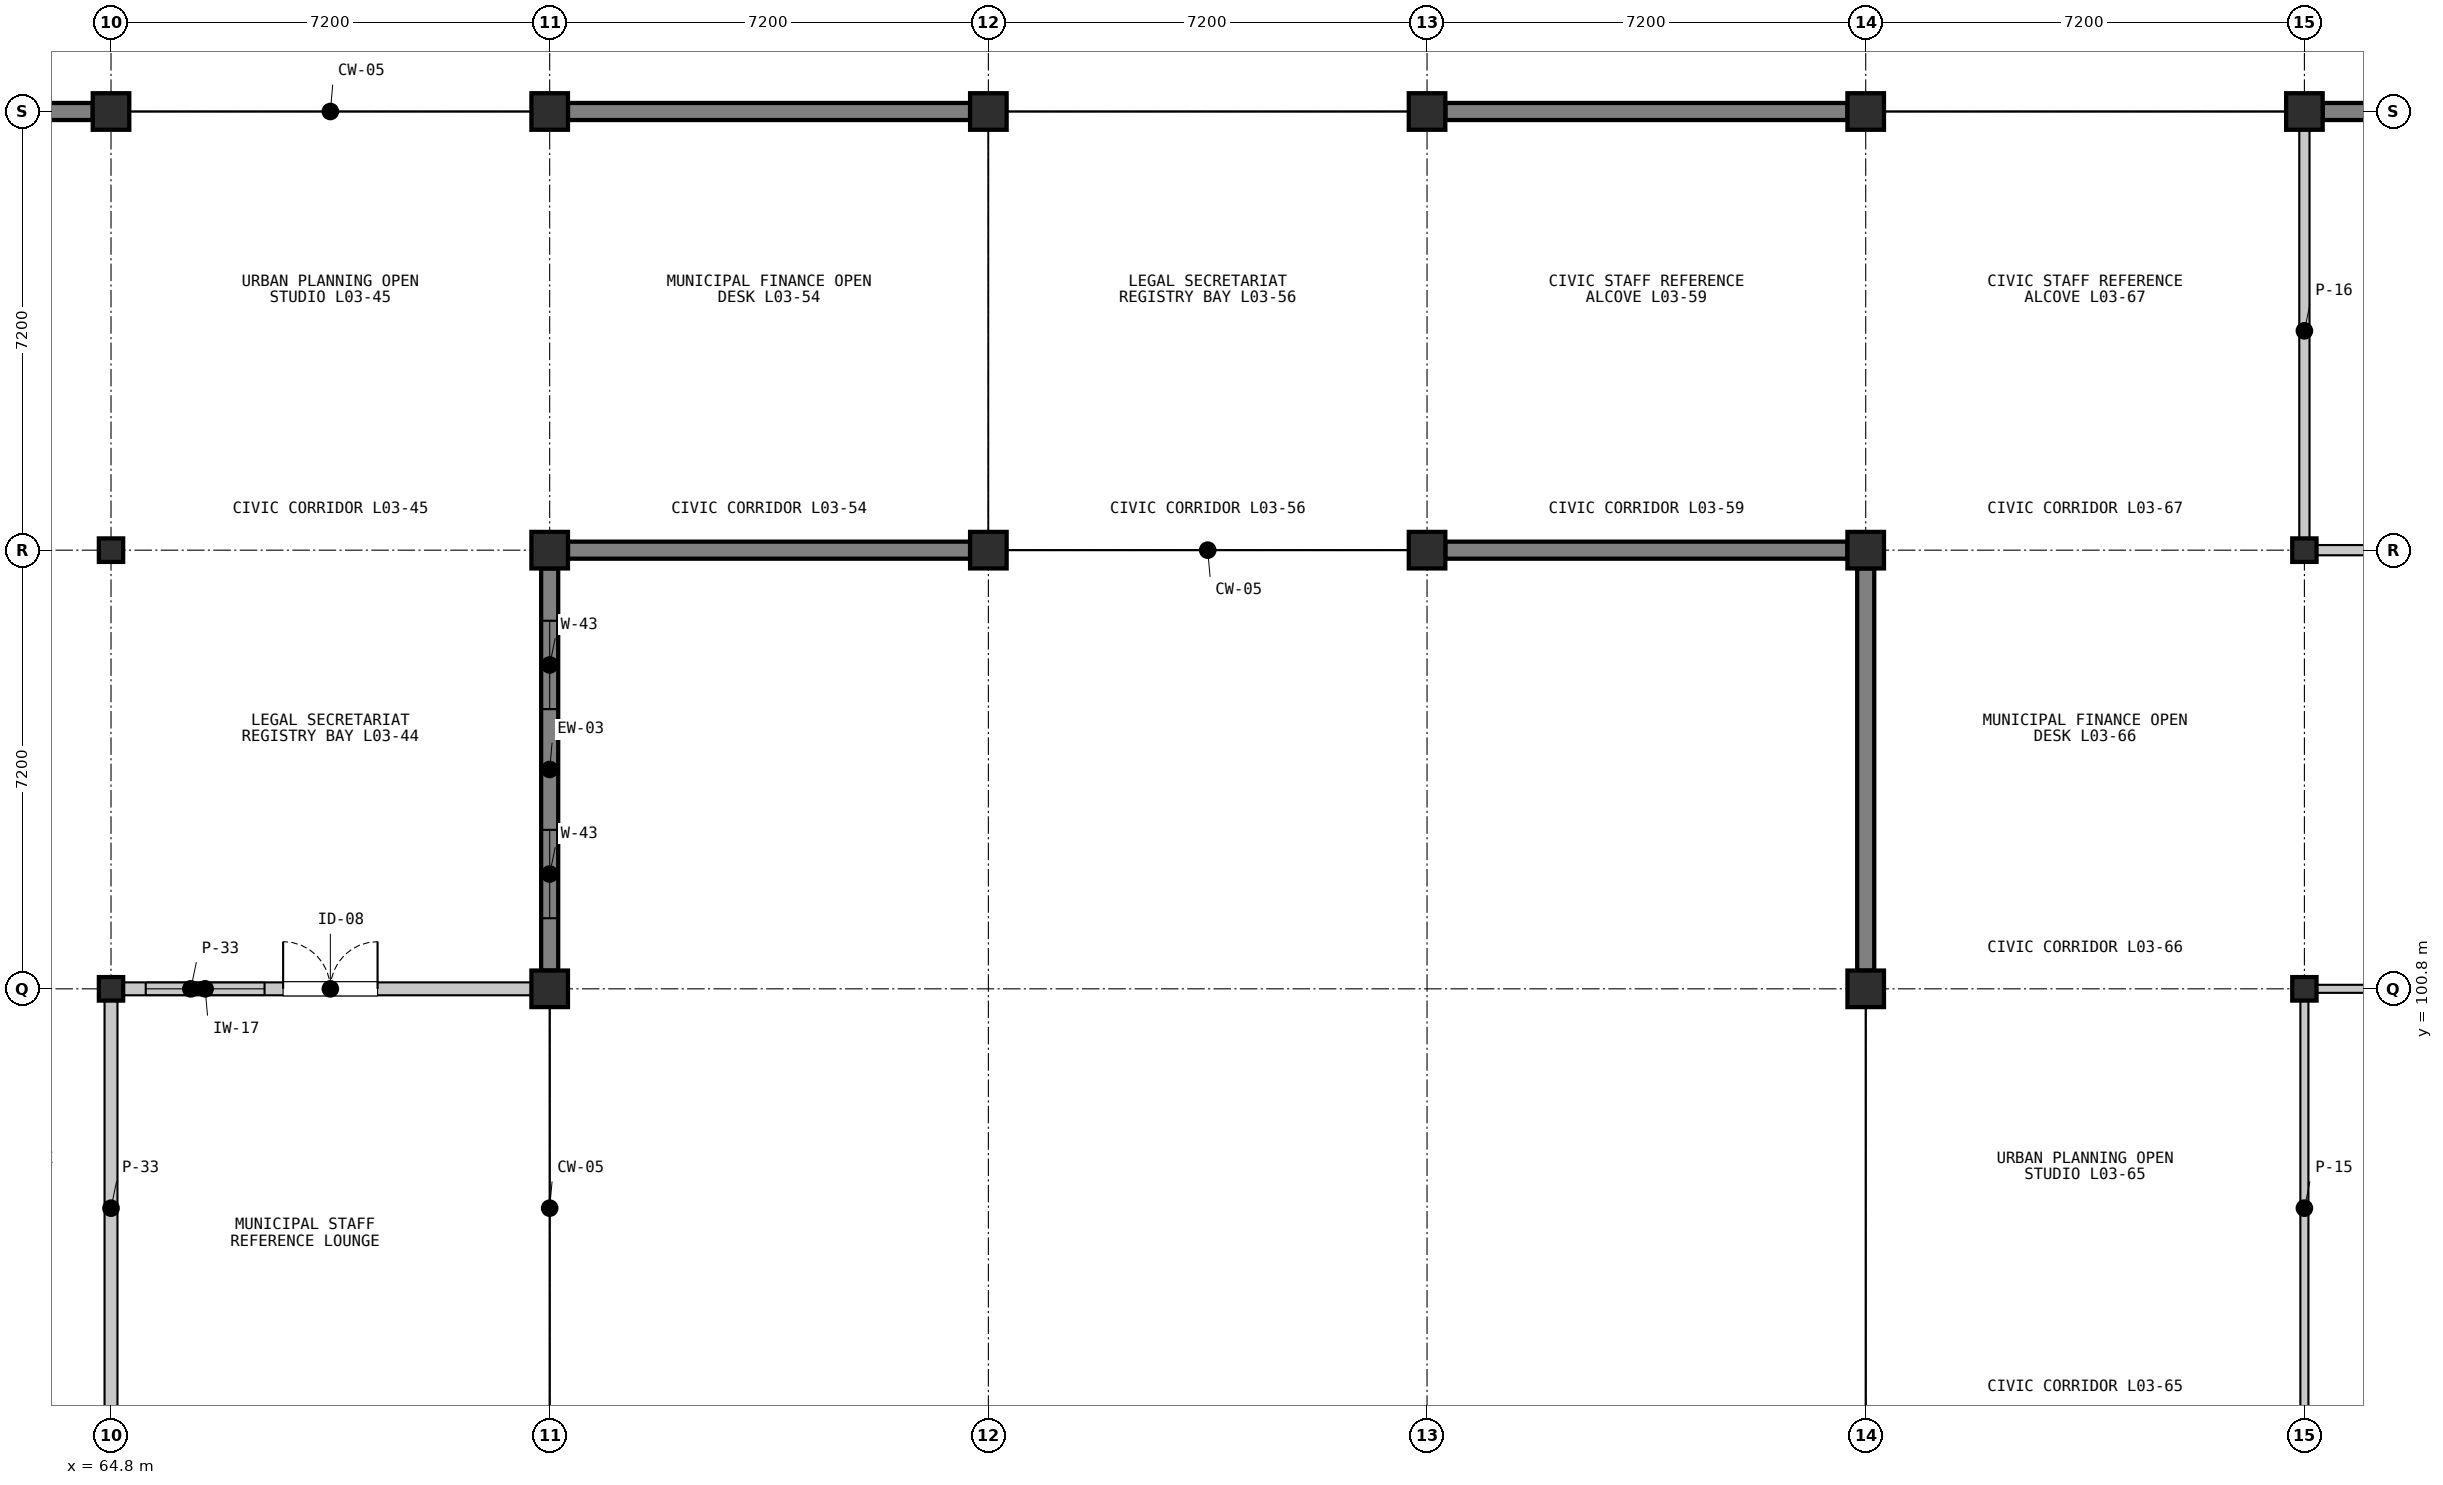
"""IFC4 building model, lengths in metres.
Left out: names, types, materials, properties, quantities, classifications, styles, units other than length and angle.
Written with IfcOpenShell. Run it as: python <this file> out.ifc"""

import sys

from ifc_helpers import new_model, si_unit, direction, frame, frame_2d, origin, origin_2d, place, context, subcontext, project, spatial, rectangle, i_section, extrude, element, fill, save


model = new_model("IFC4")
c1 = context("Model", 3, precision=1e-05, world=origin(), true_north=direction((0.0, 1.0)))
c2 = subcontext(c1, "Body", "Model", "MODEL_VIEW")
j1 = project(units=[si_unit("LENGTHUNIT", "METRE"), si_unit("PLANEANGLEUNIT", "RADIAN")], contexts=[c1])
p1 = place(None, origin())
s1 = spatial("IfcSite", under=j1, at=p1, CompositionType="ELEMENT")
p2 = place(p1, origin())
s2 = spatial("IfcBuilding", under=s1, at=p2, CompositionType="ELEMENT")
p3 = place(p2, frame((0.0, 0.0, 9.9)))
s3 = spatial("IfcBuildingStorey", under=s2, at=p3, CompositionType="ELEMENT", Elevation=9.9)
for number, where, z_axis, x_axis in (
    (1, (64.8, 100.8, 0.0), (0.0, 0.0, 1.0), (1.0, 0.0, 0.0)),
    (2, (64.8, 108.0, 0.0), (0.0, 0.0, 1.0), (1.0, 0.0, 0.0)),
):
    element("IfcColumn", number, at=place(p3, frame(where, z_axis=z_axis, x_axis=x_axis)), inside=s3, PredefinedType="COLUMN", context=c2, shape_type="SweptSolid", body=[
        extrude(i_section(OverallWidth=0.399, OverallDepth=0.386, WebThickness=0.021, FlangeThickness=0.033, FilletRadius=0.015, at=origin_2d()), origin(), (0.0, 0.0, 1.0), 4.2),
    ])
for number, where, z_axis, x_axis in (
    (3, (64.8, 115.2, 0.0), (0.0, 0.0, 1.0), (1.0, 0.0, 0.0)),
    (4, (72.0, 100.8, 0.0), (0.0, 0.0, 1.0), (1.0, 0.0, 0.0)),
    (5, (72.0, 108.0, 0.0), (0.0, 0.0, 1.0), (1.0, 0.0, 0.0)),
    (6, (72.0, 115.2, 0.0), (0.0, 0.0, 1.0), (1.0, 0.0, 0.0)),
    (7, (79.2, 108.0, 0.0), (0.0, 0.0, 1.0), (1.0, 0.0, 0.0)),
    (8, (79.2, 115.2, 0.0), (0.0, 0.0, 1.0), (1.0, 0.0, 0.0)),
    (9, (86.4, 108.0, 0.0), (0.0, 0.0, 1.0), (1.0, 0.0, 0.0)),
    (10, (86.4, 115.2, 0.0), (0.0, 0.0, 1.0), (1.0, 0.0, 0.0)),
    (11, (93.6, 100.8, 0.0), (0.0, 0.0, 1.0), (1.0, 0.0, 0.0)),
    (12, (93.6, 108.0, 0.0), (0.0, 0.0, 1.0), (1.0, 0.0, 0.0)),
    (13, (93.6, 115.2, 0.0), (0.0, 0.0, 1.0), (1.0, 0.0, 0.0)),
):
    element("IfcColumn", number, at=place(p3, frame(where, z_axis=z_axis, x_axis=x_axis)), inside=s3, PredefinedType="COLUMN", context=c2, shape_type="SweptSolid", body=[
        extrude(rectangle(XDim=0.6, YDim=0.6, at=origin_2d()), origin(), (0.0, 0.0, 1.0), 4.2),
    ])
for number, where, z_axis, x_axis in (
    (14, (100.8, 100.8, 0.0), (0.0, 0.0, 1.0), (1.0, 0.0, 0.0)),
    (15, (100.8, 108.0, 0.0), (0.0, 0.0, 1.0), (1.0, 0.0, 0.0)),
):
    element("IfcColumn", number, at=place(p3, frame(where, z_axis=z_axis, x_axis=x_axis)), inside=s3, PredefinedType="COLUMN", context=c2, shape_type="SweptSolid", body=[
        extrude(i_section(OverallWidth=0.399, OverallDepth=0.386, WebThickness=0.021, FlangeThickness=0.033, FilletRadius=0.015, at=origin_2d()), origin(), (0.0, 0.0, 1.0), 4.2),
    ])
p4 = place(p3, frame((100.8, 115.2, 0.0), z_axis=(0.0, 0.0, 1.0), x_axis=(1.0, 0.0, 0.0)))
e16 = element("IfcColumn", 16, at=p4, inside=s3, PredefinedType="COLUMN", context=c2, shape_type="SweptSolid", body=[
    extrude(rectangle(XDim=0.6, YDim=0.6, at=origin_2d()), origin(), (0.0, 0.0, 1.0), 4.2),
])
p5 = place(p3, frame((57.9, 115.2, 0.0), z_axis=(0.0, 0.0, 1.0), x_axis=(1.0, 0.0, 0.0)))
e17 = element("IfcWall", 17, at=p5, inside=s3, PredefinedType="SOLIDWALL", context=c2, shape_type="SweptSolid", body=[
    extrude(rectangle(XDim=6.6, YDim=0.28, at=frame_2d((3.3, 0.0))), origin(), (0.0, 0.0, 1.0), 3.418),
])
p6 = place(p3, frame((72.0, 107.7, 0.0), z_axis=(0.0, 0.0, 1.0), x_axis=(0.0, -1.0, 0.0)))
e18 = element("IfcWall", 18, at=p6, inside=s3, PredefinedType="SOLIDWALL", context=c2, shape_type="SweptSolid", body=[
    extrude(rectangle(XDim=6.6, YDim=0.28, at=frame_2d((3.3, 0.0))), origin(), (0.0, 0.0, 1.0), 3.487),
])
p7 = place(p6, frame((0.859, 0.0, 0.95)))
e19 = element("IfcOpeningElement", 19, at=p7, cuts=e18, PredefinedType="OPENING", context=c2, shape_type="SweptSolid", body=[
    extrude(rectangle(XDim=1.45, YDim=1.85, at=frame_2d((0.725, 0.925))), frame((0.0, 0.15, 0.0), z_axis=(0.0, -1.0, 0.0), x_axis=(1.0, 0.0, 0.0)), (0.0, 0.0, 1.0), 0.3),
])
p8 = place(p6, frame((4.291, 0.0, 0.95)))
e20 = element("IfcOpeningElement", 20, at=p8, cuts=e18, PredefinedType="OPENING", context=c2, shape_type="SweptSolid", body=[
    extrude(rectangle(XDim=1.45, YDim=1.85, at=frame_2d((0.725, 0.925))), frame((0.0, 0.15, 0.0), z_axis=(0.0, -1.0, 0.0), x_axis=(1.0, 0.0, 0.0)), (0.0, 0.0, 1.0), 0.3),
])
for number, where, z_axis, x_axis in (
    (21, (78.9, 108.0, 0.0), (0.0, 0.0, 1.0), (-1.0, 0.0, 0.0)),
    (22, (72.3, 115.2, 0.0), (0.0, 0.0, 1.0), (1.0, 0.0, 0.0)),
):
    element("IfcWall", number, at=place(p3, frame(where, z_axis=z_axis, x_axis=x_axis)), inside=s3, PredefinedType="SOLIDWALL", context=c2, shape_type="SweptSolid", body=[
        extrude(rectangle(XDim=6.6, YDim=0.28, at=frame_2d((3.3, 0.0))), origin(), (0.0, 0.0, 1.0), 3.418),
    ])
for number, where, z_axis, x_axis in (
    (23, (93.3, 108.0, 0.0), (0.0, 0.0, 1.0), (-1.0, 0.0, 0.0)),
    (24, (86.7, 115.2, 0.0), (0.0, 0.0, 1.0), (1.0, 0.0, 0.0)),
):
    element("IfcWall", number, at=place(p3, frame(where, z_axis=z_axis, x_axis=x_axis)), inside=s3, PredefinedType="SOLIDWALL", context=c2, shape_type="SweptSolid", body=[
        extrude(rectangle(XDim=6.6, YDim=0.28, at=frame_2d((3.3, 0.0))), origin(), (0.0, 0.0, 1.0), 3.418),
    ])
p9 = place(p3, frame((93.6, 101.1, 0.0), z_axis=(0.0, 0.0, 1.0), x_axis=(0.0, 1.0, 0.0)))
e25 = element("IfcWall", 25, at=p9, inside=s3, PredefinedType="SOLIDWALL", context=c2, shape_type="SweptSolid", body=[
    extrude(rectangle(XDim=6.6, YDim=0.28, at=frame_2d((3.3, 0.0))), origin(), (0.0, 0.0, 1.0), 3.487),
])
p10 = place(p3, frame((101.1, 115.2, 0.0), z_axis=(0.0, 0.0, 1.0), x_axis=(1.0, 0.0, 0.0)))
e26 = element("IfcWall", 26, at=p10, inside=s3, PredefinedType="SOLIDWALL", context=c2, shape_type="SweptSolid", body=[
    extrude(rectangle(XDim=6.65, YDim=0.28, at=frame_2d((3.325, 0.0))), origin(), (0.0, 0.0, 1.0), 3.418),
])
p11 = place(p10, frame((0.921, 0.0, 0.95)))
e27 = element("IfcOpeningElement", 27, at=p11, cuts=e26, PredefinedType="OPENING", context=c2, shape_type="SweptSolid", body=[
    extrude(rectangle(XDim=1.35, YDim=1.85, at=frame_2d((0.675, 0.925))), frame((0.0, 0.15, 0.0), z_axis=(0.0, -1.0, 0.0), x_axis=(1.0, 0.0, 0.0)), (0.0, 0.0, 1.0), 0.3),
])
p12 = place(p10, frame((4.379, 0.0, 0.95)))
e28 = element("IfcOpeningElement", 28, at=p12, cuts=e26, PredefinedType="OPENING", context=c2, shape_type="SweptSolid", body=[
    extrude(rectangle(XDim=1.35, YDim=1.85, at=frame_2d((0.675, 0.925))), frame((0.0, 0.15, 0.0), z_axis=(0.0, -1.0, 0.0), x_axis=(1.0, 0.0, 0.0)), (0.0, 0.0, 1.0), 0.3),
])
p13 = place(p3, frame((64.92, 100.8, 0.0), z_axis=(0.0, 0.0, 1.0), x_axis=(1.0, 0.0, 0.0)))
e29 = element("IfcWall", 29, at=p13, inside=s3, PredefinedType="PARTITIONING", context=c2, shape_type="SweptSolid", body=[
    extrude(rectangle(XDim=6.96, YDim=0.212, at=frame_2d((3.48, 0.0))), origin(), (0.0, 0.0, 1.0), 3.408),
])
p14 = place(p13, frame((2.705, 0.0, 0.0)))
e30 = element("IfcOpeningElement", 30, at=p14, cuts=e29, PredefinedType="OPENING", context=c2, shape_type="SweptSolid", body=[
    extrude(rectangle(XDim=1.55, YDim=2.3, at=frame_2d((0.775, 1.15))), frame((0.0, 0.116, 0.0), z_axis=(0.0, -1.0, 0.0), x_axis=(1.0, 0.0, 0.0)), (0.0, 0.0, 1.0), 0.232),
])
p15 = place(p13, frame((0.45, 0.0, 1.05)))
e31 = element("IfcOpeningElement", 31, at=p15, cuts=e29, PredefinedType="OPENING", context=c2, shape_type="SweptSolid", body=[
    extrude(rectangle(XDim=1.95, YDim=1.22, at=frame_2d((0.975, 0.61))), frame((0.0, 0.116, 0.0), z_axis=(0.0, -1.0, 0.0), x_axis=(1.0, 0.0, 0.0)), (0.0, 0.0, 1.0), 0.232),
])
p16 = place(p3, frame((64.8, 93.72, 0.0), z_axis=(0.0, 0.0, 1.0), x_axis=(0.0, 1.0, 0.0)))
e32 = element("IfcWall", 32, at=p16, inside=s3, PredefinedType="PARTITIONING", context=c2, shape_type="SweptSolid", body=[
    extrude(rectangle(XDim=6.96, YDim=0.212, at=frame_2d((3.48, 0.0))), origin(), (0.0, 0.0, 1.0), 3.408),
])
for number, where, z_axis, x_axis in (
    (33, (100.92, 100.8, 0.0), (0.0, 0.0, 1.0), (1.0, 0.0, 0.0)),
    (34, (100.8, 93.72, 0.0), (0.0, 0.0, 1.0), (0.0, 1.0, 0.0)),
):
    element("IfcWall", number, at=place(p3, frame(where, z_axis=z_axis, x_axis=x_axis)), inside=s3, PredefinedType="PARTITIONING", context=c2, shape_type="SweptSolid", body=[
        extrude(rectangle(XDim=6.96, YDim=0.132, at=frame_2d((3.48, 0.0))), origin(), (0.0, 0.0, 1.0), 3.408),
    ])
p17 = place(p3, frame((107.88, 108.0, 0.0), z_axis=(0.0, 0.0, 1.0), x_axis=(-1.0, 0.0, 0.0)))
e35 = element("IfcWall", 35, at=p17, inside=s3, PredefinedType="PARTITIONING", context=c2, shape_type="SweptSolid", body=[
    extrude(rectangle(XDim=6.96, YDim=0.168, at=frame_2d((3.48, 0.0))), origin(), (0.0, 0.0, 1.0), 3.408),
])
p18 = place(p17, frame((2.705, 0.0, 0.0)))
e36 = element("IfcOpeningElement", 36, at=p18, cuts=e35, PredefinedType="OPENING", context=c2, shape_type="SweptSolid", body=[
    extrude(rectangle(XDim=1.55, YDim=2.3, at=frame_2d((0.775, 1.15))), frame((0.0, 0.094, 0.0), z_axis=(0.0, -1.0, 0.0), x_axis=(1.0, 0.0, 0.0)), (0.0, 0.0, 1.0), 0.188),
])
p19 = place(p17, frame((0.45, 0.0, 1.05)))
e37 = element("IfcOpeningElement", 37, at=p19, cuts=e35, PredefinedType="OPENING", context=c2, shape_type="SweptSolid", body=[
    extrude(rectangle(XDim=1.82, YDim=1.02, at=frame_2d((0.91, 0.51))), frame((0.0, 0.094, 0.0), z_axis=(0.0, -1.0, 0.0), x_axis=(1.0, 0.0, 0.0)), (0.0, 0.0, 1.0), 0.188),
])
p20 = place(p3, frame((100.8, 108.12, 0.0), z_axis=(0.0, 0.0, 1.0), x_axis=(0.0, 1.0, 0.0)))
e38 = element("IfcWall", 38, at=p20, inside=s3, PredefinedType="PARTITIONING", context=c2, shape_type="SweptSolid", body=[
    extrude(rectangle(XDim=6.96, YDim=0.168, at=frame_2d((3.48, 0.0))), origin(), (0.0, 0.0, 1.0), 3.408),
])
p21 = place(p7, origin())
e39 = element("IfcWindow", 39, at=p21, inside=s3, PartitioningType="SINGLE_PANEL", PredefinedType="WINDOW", context=c2, shape_type="SweptSolid", body=[
    extrude(rectangle(XDim=1.45, YDim=1.85, at=frame_2d((0.725, 0.925))), frame((0.0, 0.03, 0.0), z_axis=(0.0, -1.0, 0.0), x_axis=(1.0, 0.0, 0.0)), (0.0, 0.0, 1.0), 0.06),
])
fill(e19, e39)
p22 = place(p8, origin())
e40 = element("IfcWindow", 40, at=p22, inside=s3, PartitioningType="SINGLE_PANEL", PredefinedType="WINDOW", context=c2, shape_type="SweptSolid", body=[
    extrude(rectangle(XDim=1.45, YDim=1.85, at=frame_2d((0.725, 0.925))), frame((0.0, 0.03, 0.0), z_axis=(0.0, -1.0, 0.0), x_axis=(1.0, 0.0, 0.0)), (0.0, 0.0, 1.0), 0.06),
])
fill(e20, e40)
p23 = place(p14, origin())
e41 = element("IfcDoor", 41, at=p23, inside=s3, OperationType="DOUBLE_DOOR_SINGLE_SWING", PredefinedType="DOOR", context=c2, shape_type="SweptSolid", body=[
    extrude(rectangle(XDim=1.55, YDim=2.3, at=frame_2d((0.775, 1.15))), frame((0.0, 0.025, 0.0), z_axis=(0.0, -1.0, 0.0), x_axis=(1.0, 0.0, 0.0)), (0.0, 0.0, 1.0), 0.05),
])
fill(e30, e41)
p24 = place(p15, origin())
e42 = element("IfcWindow", 42, at=p24, inside=s3, PartitioningType="SINGLE_PANEL", PredefinedType="WINDOW", context=c2, shape_type="SweptSolid", body=[
    extrude(rectangle(XDim=1.95, YDim=1.22, at=frame_2d((0.975, 0.61))), frame((0.0, 0.03, 0.0), z_axis=(0.0, -1.0, 0.0), x_axis=(1.0, 0.0, 0.0)), (0.0, 0.0, 1.0), 0.06),
])
fill(e31, e42)
save(model, sys.argv[1])
